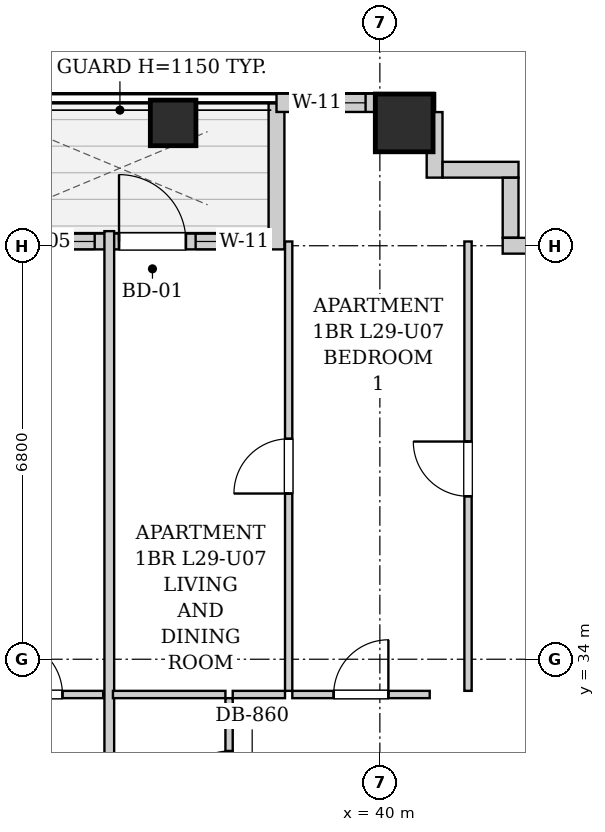
"""IFC4 building model, lengths in metres.
Left out: names, types, materials, properties, quantities, classifications, styles, units other than length and angle.
Written with IfcOpenShell. Run it as: python <this file> out.ifc"""

import sys

from ifc_helpers import new_model, si_unit, direction, frame, frame_2d, origin, origin_2d, place, context, subcontext, project, spatial, rectangle, extrude, element, fill, save


model = new_model("IFC4")
c1 = context("Model", 3, precision=1e-05, world=origin(), true_north=direction((0.0, 1.0)))
c2 = subcontext(c1, "Body", "Model", "MODEL_VIEW")
j1 = project(units=[si_unit("LENGTHUNIT", "METRE"), si_unit("PLANEANGLEUNIT", "RADIAN")], contexts=[c1])
p1 = place(None, origin())
s1 = spatial("IfcSite", under=j1, at=p1, CompositionType="ELEMENT")
p2 = place(p1, origin())
s2 = spatial("IfcBuilding", under=s1, at=p2, CompositionType="ELEMENT")
p3 = place(p2, frame((0.0, 0.0, 103.9)))
s3 = spatial("IfcBuildingStorey", under=s2, at=p3, CompositionType="ELEMENT", Elevation=103.9)
p4 = place(p3, frame((36.6, 42.82, 0.0), z_axis=(0.0, 0.0, 1.0), x_axis=(1.0, 0.0, 0.0)))
e1 = element("IfcColumn", 1, at=p4, inside=s3, PredefinedType="COLUMN", context=c2, shape_type="SweptSolid", body=[
    extrude(rectangle(XDim=0.75, YDim=0.75, at=origin_2d()), origin(), (0.0, 0.0, 1.0), 3.2),
])
p5 = place(p3, frame((40.4, 42.82, 0.0), z_axis=(0.0, 0.0, 1.0), x_axis=(1.0, 0.0, 0.0)))
e2 = element("IfcColumn", 2, at=p5, inside=s3, PredefinedType="COLUMN", context=c2, shape_type="SweptSolid", body=[
    extrude(rectangle(XDim=0.95, YDim=0.95, at=origin_2d()), origin(), (0.0, 0.0, 1.0), 3.2),
])
p6 = place(p3, frame((33.284, 40.87, 0.0), z_axis=(0.0, 0.0, 1.0), x_axis=(1.0, 0.0, 0.0)))
e3 = element("IfcWall", 3, at=p6, inside=s3, PredefinedType="SOLIDWALL", context=c2, shape_type="SweptSolid", body=[
    extrude(rectangle(XDim=4.882, YDim=0.26, at=frame_2d((2.441, 0.0))), origin(), (0.0, 0.0, 1.0), 2.94),
])
p7 = place(p6, frame((2.426, 0.0, 0.0)))
e4 = element("IfcOpeningElement", 4, at=p7, cuts=e3, PredefinedType="OPENING", context=c2, shape_type="SweptSolid", body=[
    extrude(rectangle(XDim=1.1, YDim=2.0, at=frame_2d((0.55, 1.0))), frame((0.0, 0.14, 0.0), z_axis=(0.0, -1.0, 0.0), x_axis=(1.0, 0.0, 0.0)), (0.0, 0.0, 1.0), 0.28),
])
p8 = place(p6, frame((0.426, 0.0, 0.85)))
e5 = element("IfcOpeningElement", 5, at=p8, cuts=e3, PredefinedType="OPENING", context=c2, shape_type="SweptSolid", body=[
    extrude(rectangle(XDim=1.6, YDim=1.65, at=frame_2d((0.8, 0.825))), frame((0.0, 0.14, 0.0), z_axis=(0.0, -1.0, 0.0), x_axis=(1.0, 0.0, 0.0)), (0.0, 0.0, 1.0), 0.28),
])
p9 = place(p6, frame((3.686, 0.0, 0.55)))
e6 = element("IfcOpeningElement", 6, at=p9, cuts=e3, PredefinedType="OPENING", context=c2, shape_type="SweptSolid", body=[
    extrude(rectangle(XDim=0.85, YDim=1.2, at=frame_2d((0.425, 0.6))), frame((0.0, 0.14, 0.0), z_axis=(0.0, -1.0, 0.0), x_axis=(1.0, 0.0, 0.0)), (0.0, 0.0, 1.0), 0.28),
])
p10 = place(p3, frame((38.3, 40.74, 0.0), z_axis=(0.0, 0.0, 1.0), x_axis=(0.0, 1.0, 0.0)))
e7 = element("IfcWall", 7, at=p10, inside=s3, PredefinedType="SOLIDWALL", context=c2, shape_type="SweptSolid", body=[
    extrude(rectangle(XDim=2.4, YDim=0.26, at=frame_2d((1.2, 0.0))), origin(), (0.0, 0.0, 1.0), 2.94),
])
p11 = place(p3, frame((38.3, 43.15, 0.0), z_axis=(0.0, 0.0, 1.0), x_axis=(1.0, 0.0, 0.0)))
e8 = element("IfcWall", 8, at=p11, inside=s3, PredefinedType="SOLIDWALL", context=c2, shape_type="SweptSolid", body=[
    extrude(rectangle(XDim=2.6, YDim=0.3, at=frame_2d((1.3, 0.0))), origin(), (0.0, 0.0, 1.0), 2.94),
])
p12 = place(p11, frame((0.615, 0.0, 0.55)))
e9 = element("IfcOpeningElement", 9, at=p12, cuts=e8, PredefinedType="OPENING", context=c2, shape_type="SweptSolid", body=[
    extrude(rectangle(XDim=0.85, YDim=1.2, at=frame_2d((0.425, 0.6))), frame((0.0, 0.16, 0.0), z_axis=(0.0, -1.0, 0.0), x_axis=(1.0, 0.0, 0.0)), (0.0, 0.0, 1.0), 0.32),
])
p13 = place(p3, frame((40.9, 42.998, 0.0), z_axis=(0.0, 0.0, 1.0), x_axis=(0.0, -1.0, 0.0)))
e10 = element("IfcWall", 10, at=p13, inside=s3, PredefinedType="SOLIDWALL", context=c2, shape_type="SweptSolid", body=[
    extrude(rectangle(XDim=1.078, YDim=0.26, at=frame_2d((0.539, 0.0))), origin(), (0.0, 0.0, 1.0), 2.94),
])
p14 = place(p3, frame((41.032, 42.05, 0.0), z_axis=(0.0, 0.0, 1.0), x_axis=(1.0, 0.0, 0.0)))
e11 = element("IfcWall", 11, at=p14, inside=s3, PredefinedType="SOLIDWALL", context=c2, shape_type="SweptSolid", body=[
    extrude(rectangle(XDim=1.248, YDim=0.26, at=frame_2d((0.624, 0.0))), origin(), (0.0, 0.0, 1.0), 2.94),
])
p15 = place(p3, frame((42.15, 41.918, 0.0), z_axis=(0.0, 0.0, 1.0), x_axis=(0.0, -1.0, 0.0)))
e12 = element("IfcWall", 12, at=p15, inside=s3, PredefinedType="SOLIDWALL", context=c2, shape_type="SweptSolid", body=[
    extrude(rectangle(XDim=0.986, YDim=0.26, at=frame_2d((0.493, 0.0))), origin(), (0.0, 0.0, 1.0), 2.94),
])
p16 = place(p3, frame((42.02, 40.8, 0.0), z_axis=(0.0, 0.0, 1.0), x_axis=(1.0, 0.0, 0.0)))
e13 = element("IfcWall", 13, at=p16, inside=s3, PredefinedType="SOLIDWALL", context=c2, shape_type="SweptSolid", body=[
    extrude(rectangle(XDim=1.078, YDim=0.26, at=frame_2d((0.539, 0.0))), origin(), (0.0, 0.0, 1.0), 2.94),
])
p17 = place(p3, frame((33.21, 33.42, 0.0), z_axis=(0.0, 0.0, 1.0), x_axis=(1.0, 0.0, 0.0)))
e14 = element("IfcWall", 14, at=p17, inside=s3, PredefinedType="PARTITIONING", context=c2, shape_type="SweptSolid", body=[
    extrude(rectangle(XDim=2.24, YDim=0.12, at=frame_2d((1.12, 0.0))), origin(), (0.0, 0.0, 1.0), 2.94),
])
p18 = place(p17, frame((0.67, 0.0, 0.0)))
e15 = element("IfcOpeningElement", 15, at=p18, cuts=e14, PredefinedType="OPENING", context=c2, shape_type="SweptSolid", body=[
    extrude(rectangle(XDim=0.9, YDim=2.05, at=frame_2d((0.45, 1.025))), frame((0.0, 0.07, 0.0), z_axis=(0.0, -1.0, 0.0), x_axis=(1.0, 0.0, 0.0)), (0.0, 0.0, 1.0), 0.14),
])
p19 = place(p3, frame((35.55, 30.76, 0.0), z_axis=(0.0, 0.0, 1.0), x_axis=(0.0, 1.0, 0.0)))
e16 = element("IfcWall", 16, at=p19, inside=s3, PredefinedType="PARTITIONING", context=c2, shape_type="SweptSolid", body=[
    extrude(rectangle(XDim=10.28, YDim=0.16, at=frame_2d((5.14, 0.0))), origin(), (0.0, 0.0, 1.0), 2.94),
])
p20 = place(p3, frame((37.52, 30.76, 0.0), z_axis=(0.0, 0.0, 1.0), x_axis=(0.0, 1.0, 0.0)))
e17 = element("IfcWall", 17, at=p20, inside=s3, PredefinedType="PARTITIONING", context=c2, shape_type="SweptSolid", body=[
    extrude(rectangle(XDim=2.6, YDim=0.12, at=frame_2d((1.3, 0.0))), origin(), (0.0, 0.0, 1.0), 2.94),
])
p21 = place(p20, frame((0.87, 0.0, 0.0)))
e18 = element("IfcOpeningElement", 18, at=p21, cuts=e17, PredefinedType="OPENING", context=c2, shape_type="SweptSolid", body=[
    extrude(rectangle(XDim=0.86, YDim=2.05, at=frame_2d((0.43, 1.025))), frame((0.0, 0.07, 0.0), z_axis=(0.0, -1.0, 0.0), x_axis=(1.0, 0.0, 0.0)), (0.0, 0.0, 1.0), 0.14),
])
p22 = place(p3, frame((35.61, 33.42, 0.0), z_axis=(0.0, 0.0, 1.0), x_axis=(1.0, 0.0, 0.0)))
e19 = element("IfcWall", 19, at=p22, inside=s3, PredefinedType="PARTITIONING", context=c2, shape_type="SweptSolid", body=[
    extrude(rectangle(XDim=1.85, YDim=0.12, at=frame_2d((0.925, 0.0))), origin(), (0.0, 0.0, 1.0), 2.94),
])
p23 = place(p3, frame((37.58, 33.42, 0.0), z_axis=(0.0, 0.0, 1.0), x_axis=(1.0, 0.0, 0.0)))
e20 = element("IfcWall", 20, at=p23, inside=s3, PredefinedType="PARTITIONING", context=c2, shape_type="SweptSolid", body=[
    extrude(rectangle(XDim=0.86, YDim=0.12, at=frame_2d((0.43, 0.0))), origin(), (0.0, 0.0, 1.0), 2.94),
])
p24 = place(p3, frame((38.56, 33.42, 0.0), z_axis=(0.0, 0.0, 1.0), x_axis=(1.0, 0.0, 0.0)))
e21 = element("IfcWall", 21, at=p24, inside=s3, PredefinedType="PARTITIONING", context=c2, shape_type="SweptSolid", body=[
    extrude(rectangle(XDim=2.26, YDim=0.12, at=frame_2d((1.13, 0.0))), origin(), (0.0, 0.0, 1.0), 2.94),
])
p25 = place(p24, frame((0.68, 0.0, 0.0)))
e22 = element("IfcOpeningElement", 22, at=p25, cuts=e21, PredefinedType="OPENING", context=c2, shape_type="SweptSolid", body=[
    extrude(rectangle(XDim=0.9, YDim=2.05, at=frame_2d((0.45, 1.025))), frame((0.0, 0.07, 0.0), z_axis=(0.0, -1.0, 0.0), x_axis=(1.0, 0.0, 0.0)), (0.0, 0.0, 1.0), 0.14),
])
p26 = place(p3, frame((38.5, 33.48, 0.0), z_axis=(0.0, 0.0, 1.0), x_axis=(0.0, 1.0, 0.0)))
e23 = element("IfcWall", 23, at=p26, inside=s3, PredefinedType="PARTITIONING", context=c2, shape_type="SweptSolid", body=[
    extrude(rectangle(XDim=7.39, YDim=0.12, at=frame_2d((3.695, 0.0))), origin(), (0.0, 0.0, 1.0), 2.94),
])
p27 = place(p26, frame((3.245, 0.0, 0.0)))
e24 = element("IfcOpeningElement", 24, at=p27, cuts=e23, PredefinedType="OPENING", context=c2, shape_type="SweptSolid", body=[
    extrude(rectangle(XDim=0.9, YDim=2.05, at=frame_2d((0.45, 1.025))), frame((0.0, 0.07, 0.0), z_axis=(0.0, -1.0, 0.0), x_axis=(1.0, 0.0, 0.0)), (0.0, 0.0, 1.0), 0.14),
])
p28 = place(p3, frame((41.45, 33.48, 0.0), z_axis=(0.0, 0.0, 1.0), x_axis=(0.0, 1.0, 0.0)))
e25 = element("IfcWall", 25, at=p28, inside=s3, PredefinedType="PARTITIONING", context=c2, shape_type="SweptSolid", body=[
    extrude(rectangle(XDim=7.39, YDim=0.12, at=frame_2d((3.695, 0.0))), origin(), (0.0, 0.0, 1.0), 2.94),
])
p29 = place(p28, frame((3.2, 0.0, 0.0)))
e26 = element("IfcOpeningElement", 26, at=p29, cuts=e25, PredefinedType="OPENING", context=c2, shape_type="SweptSolid", body=[
    extrude(rectangle(XDim=0.9, YDim=2.05, at=frame_2d((0.45, 1.025))), frame((0.0, 0.07, 0.0), z_axis=(0.0, -1.0, 0.0), x_axis=(1.0, 0.0, 0.0)), (0.0, 0.0, 1.0), 0.14),
])
p30 = place(p18, origin())
e27 = element("IfcDoor", 27, at=p30, inside=s3, OperationType="SINGLE_SWING_LEFT", PredefinedType="DOOR", context=c2, shape_type="SweptSolid", body=[
    extrude(rectangle(XDim=0.9, YDim=2.05, at=frame_2d((0.45, 1.025))), frame((0.0, 0.025, 0.0), z_axis=(0.0, -1.0, 0.0), x_axis=(1.0, 0.0, 0.0)), (0.0, 0.0, 1.0), 0.05),
])
fill(e15, e27)
p31 = place(p21, origin())
e28 = element("IfcDoor", 28, at=p31, inside=s3, OperationType="SINGLE_SWING_LEFT", PredefinedType="DOOR", context=c2, shape_type="SweptSolid", body=[
    extrude(rectangle(XDim=0.86, YDim=2.05, at=frame_2d((0.43, 1.025))), frame((0.0, 0.025, 0.0), z_axis=(0.0, -1.0, 0.0), x_axis=(1.0, 0.0, 0.0)), (0.0, 0.0, 1.0), 0.05),
])
fill(e18, e28)
p32 = place(p25, origin())
e29 = element("IfcDoor", 29, at=p32, inside=s3, OperationType="SINGLE_SWING_RIGHT", PredefinedType="DOOR", context=c2, shape_type="SweptSolid", body=[
    extrude(rectangle(XDim=0.9, YDim=2.05, at=frame_2d((0.45, 1.025))), frame((0.0, 0.025, 0.0), z_axis=(0.0, -1.0, 0.0), x_axis=(1.0, 0.0, 0.0)), (0.0, 0.0, 1.0), 0.05),
])
fill(e22, e29)
p33 = place(p27, origin())
e30 = element("IfcDoor", 30, at=p33, inside=s3, OperationType="SINGLE_SWING_LEFT", PredefinedType="DOOR", context=c2, shape_type="SweptSolid", body=[
    extrude(rectangle(XDim=0.9, YDim=2.05, at=frame_2d((0.45, 1.025))), frame((0.0, 0.025, 0.0), z_axis=(0.0, -1.0, 0.0), x_axis=(1.0, 0.0, 0.0)), (0.0, 0.0, 1.0), 0.05),
])
fill(e24, e30)
p34 = place(p29, origin())
e31 = element("IfcDoor", 31, at=p34, inside=s3, OperationType="SINGLE_SWING_RIGHT", PredefinedType="DOOR", context=c2, shape_type="SweptSolid", body=[
    extrude(rectangle(XDim=0.9, YDim=2.05, at=frame_2d((0.45, 1.025))), frame((0.0, 0.025, 0.0), z_axis=(0.0, -1.0, 0.0), x_axis=(1.0, 0.0, 0.0)), (0.0, 0.0, 1.0), 0.05),
])
fill(e26, e31)
p35 = place(p7, origin())
e32 = element("IfcDoor", 32, at=p35, inside=s3, OperationType="SINGLE_SWING_LEFT", PredefinedType="DOOR", context=c2, shape_type="SweptSolid", body=[
    extrude(rectangle(XDim=1.1, YDim=2.0, at=frame_2d((0.55, 1.0))), frame((0.0, 0.025, 0.0), z_axis=(0.0, -1.0, 0.0), x_axis=(1.0, 0.0, 0.0)), (0.0, 0.0, 1.0), 0.05),
])
fill(e4, e32)
p36 = place(p8, origin())
e33 = element("IfcWindow", 33, at=p36, inside=s3, PartitioningType="DOUBLE_PANEL_VERTICAL", PredefinedType="WINDOW", context=c2, shape_type="SweptSolid", body=[
    extrude(rectangle(XDim=1.6, YDim=1.65, at=frame_2d((0.8, 0.825))), frame((0.0, 0.03, 0.0), z_axis=(0.0, -1.0, 0.0), x_axis=(1.0, 0.0, 0.0)), (0.0, 0.0, 1.0), 0.06),
])
fill(e5, e33)
p37 = place(p9, origin())
e34 = element("IfcWindow", 34, at=p37, inside=s3, PartitioningType="SINGLE_PANEL", PredefinedType="WINDOW", context=c2, shape_type="SweptSolid", body=[
    extrude(rectangle(XDim=0.85, YDim=1.2, at=frame_2d((0.425, 0.6))), frame((0.0, 0.03, 0.0), z_axis=(0.0, -1.0, 0.0), x_axis=(1.0, 0.0, 0.0)), (0.0, 0.0, 1.0), 0.06),
])
fill(e6, e34)
p38 = place(p12, origin())
e35 = element("IfcWindow", 35, at=p38, inside=s3, PartitioningType="SINGLE_PANEL", PredefinedType="WINDOW", context=c2, shape_type="SweptSolid", body=[
    extrude(rectangle(XDim=0.85, YDim=1.2, at=frame_2d((0.425, 0.6))), frame((0.0, 0.03, 0.0), z_axis=(0.0, -1.0, 0.0), x_axis=(1.0, 0.0, 0.0)), (0.0, 0.0, 1.0), 0.06),
])
fill(e9, e35)
save(model, sys.argv[1])
